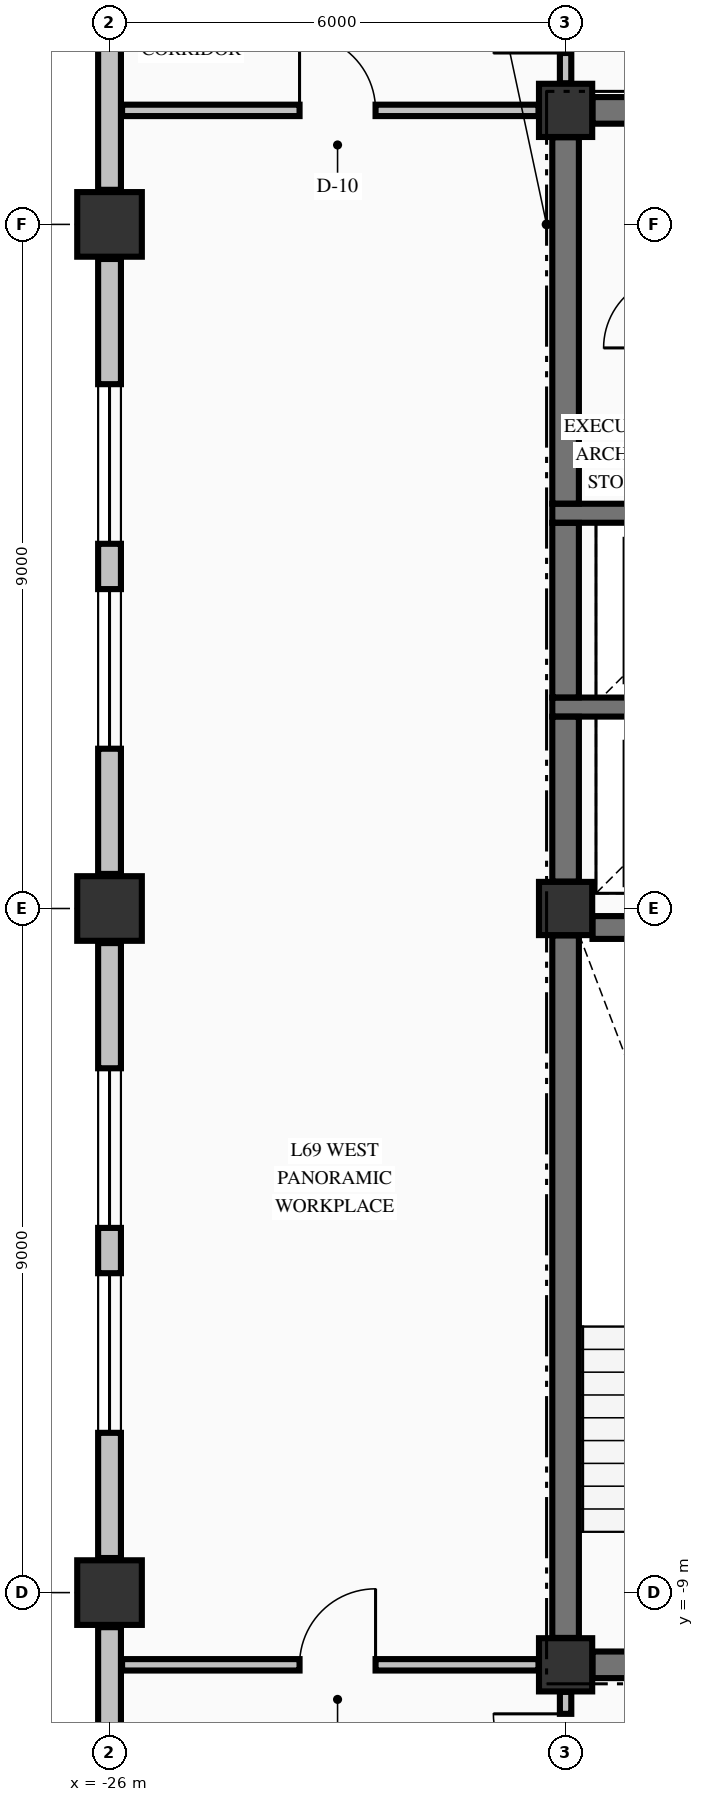
"""IFC4 building model, lengths in metres.
Left out: names, types, materials, properties, quantities, classifications, styles, units other than length and angle.
Written with IfcOpenShell. Run it as: python <this file> out.ifc"""

import sys

from ifc_helpers import new_model, si_unit, direction, frame, frame_2d, origin, origin_2d, place, context, subcontext, project, spatial, rectangle, extrude, element, fill, save


model = new_model("IFC4")
c1 = context("Model", 3, precision=1e-05, world=origin(), true_north=direction((0.0, 1.0)))
c2 = subcontext(c1, "Body", "Model", "MODEL_VIEW")
j1 = project(units=[si_unit("LENGTHUNIT", "METRE"), si_unit("PLANEANGLEUNIT", "RADIAN")], contexts=[c1])
p1 = place(None, origin())
s1 = spatial("IfcSite", under=j1, at=p1, CompositionType="ELEMENT")
p2 = place(p1, origin())
s2 = spatial("IfcBuilding", under=s1, at=p2, CompositionType="ELEMENT")
p3 = place(p2, frame((0.0, 0.0, 260.89)))
s3 = spatial("IfcBuildingStorey", under=s2, at=p3, CompositionType="ELEMENT", Elevation=260.89)
for number, where, z_axis, x_axis in (
    (1, (-26.0, -9.0, -0.25), (0.0, 0.0, 1.0), (1.0, 0.0, 0.0)),
    (2, (-26.0, 0.0, -0.25), (0.0, 0.0, 1.0), (1.0, 0.0, 0.0)),
    (3, (-26.0, 9.0, -0.25), (0.0, 0.0, 1.0), (1.0, 0.0, 0.0)),
):
    element("IfcColumn", number, at=place(p3, frame(where, z_axis=z_axis, x_axis=x_axis)), inside=s3, PredefinedType="COLUMN", context=c2, shape_type="SweptSolid", body=[
        extrude(rectangle(XDim=0.85, YDim=0.85, at=origin_2d()), origin(), (0.0, 0.0, 1.0), 3.23),
    ])
for number, where, z_axis, x_axis in (
    (4, (-20.0, -9.95, -0.25), (0.0, 0.0, 1.0), (1.0, 0.0, 0.0)),
    (5, (-20.0, 10.5, -0.25), (0.0, 0.0, 1.0), (1.0, 0.0, 0.0)),
    (6, (-20.0, 0.0, -0.25), (0.0, 0.0, 1.0), (1.0, 0.0, 0.0)),
):
    element("IfcColumn", number, at=place(p3, frame(where, z_axis=z_axis, x_axis=x_axis)), inside=s3, PredefinedType="COLUMN", context=c2, shape_type="SweptSolid", body=[
        extrude(rectangle(XDim=0.7, YDim=0.7, at=origin_2d()), origin(), (0.0, 0.0, 1.0), 3.23),
    ])
p4 = place(p3, frame((-26.0, -9.455, 0.0), z_axis=(0.0, 0.0, 1.0), x_axis=(0.0, -1.0, 0.0)))
e7 = element("IfcWall", 7, at=p4, inside=s3, PredefinedType="STANDARD", context=c2, shape_type="SweptSolid", body=[
    extrude(rectangle(XDim=8.09, YDim=0.3, at=frame_2d((4.045, 0.0))), origin(), (0.0, 0.0, 1.0), 2.372),
])
p5 = place(p3, frame((-26.0, -0.455, 0.0), z_axis=(0.0, 0.0, 1.0), x_axis=(0.0, -1.0, 0.0)))
e8 = element("IfcWall", 8, at=p5, inside=s3, PredefinedType="STANDARD", context=c2, shape_type="SweptSolid", body=[
    extrude(rectangle(XDim=8.09, YDim=0.3, at=frame_2d((4.045, 0.0))), origin(), (0.0, 0.0, 1.0), 2.372),
])
p6 = place(p5, frame((1.647, 0.0, 0.7)))
e9 = element("IfcOpeningElement", 9, at=p6, cuts=e8, PredefinedType="OPENING", context=c2, shape_type="SweptSolid", body=[
    extrude(rectangle(XDim=2.1, YDim=1.5, at=frame_2d((1.05, 0.75))), frame((0.0, 0.16, 0.0), z_axis=(0.0, -1.0, 0.0), x_axis=(1.0, 0.0, 0.0)), (0.0, 0.0, 1.0), 0.32),
])
p7 = place(p5, frame((4.343, 0.0, 0.7)))
e10 = element("IfcOpeningElement", 10, at=p7, cuts=e8, PredefinedType="OPENING", context=c2, shape_type="SweptSolid", body=[
    extrude(rectangle(XDim=2.1, YDim=1.5, at=frame_2d((1.05, 0.75))), frame((0.0, 0.16, 0.0), z_axis=(0.0, -1.0, 0.0), x_axis=(1.0, 0.0, 0.0)), (0.0, 0.0, 1.0), 0.32),
])
p8 = place(p3, frame((-26.0, 8.545, 0.0), z_axis=(0.0, 0.0, 1.0), x_axis=(0.0, -1.0, 0.0)))
e11 = element("IfcWall", 11, at=p8, inside=s3, PredefinedType="STANDARD", context=c2, shape_type="SweptSolid", body=[
    extrude(rectangle(XDim=8.09, YDim=0.3, at=frame_2d((4.045, 0.0))), origin(), (0.0, 0.0, 1.0), 2.372),
])
p9 = place(p8, frame((1.647, 0.0, 0.7)))
e12 = element("IfcOpeningElement", 12, at=p9, cuts=e11, PredefinedType="OPENING", context=c2, shape_type="SweptSolid", body=[
    extrude(rectangle(XDim=2.1, YDim=1.5, at=frame_2d((1.05, 0.75))), frame((0.0, 0.16, 0.0), z_axis=(0.0, -1.0, 0.0), x_axis=(1.0, 0.0, 0.0)), (0.0, 0.0, 1.0), 0.32),
])
p10 = place(p8, frame((4.343, 0.0, 0.7)))
e13 = element("IfcOpeningElement", 13, at=p10, cuts=e11, PredefinedType="OPENING", context=c2, shape_type="SweptSolid", body=[
    extrude(rectangle(XDim=2.1, YDim=1.5, at=frame_2d((1.05, 0.75))), frame((0.0, 0.16, 0.0), z_axis=(0.0, -1.0, 0.0), x_axis=(1.0, 0.0, 0.0)), (0.0, 0.0, 1.0), 0.32),
])
p11 = place(p3, frame((-26.0, 17.545, 0.0), z_axis=(0.0, 0.0, 1.0), x_axis=(0.0, -1.0, 0.0)))
e14 = element("IfcWall", 14, at=p11, inside=s3, PredefinedType="STANDARD", context=c2, shape_type="SweptSolid", body=[
    extrude(rectangle(XDim=8.09, YDim=0.3, at=frame_2d((4.045, 0.0))), origin(), (0.0, 0.0, 1.0), 2.372),
])
p12 = place(p3, frame((-19.646, -9.95, 0.0), z_axis=(0.0, 0.0, 1.0), x_axis=(1.0, 0.0, 0.0)))
e15 = element("IfcWall", 15, at=p12, inside=s3, PredefinedType="SHEAR", context=c2, shape_type="SweptSolid", body=[
    extrude(rectangle(XDim=4.946, YDim=0.35, at=frame_2d((2.473, 0.0))), origin(), (0.0, 0.0, 1.0), 2.98),
])
p13 = place(p12, frame((0.821, 0.0, 0.0)))
e16 = element("IfcOpeningElement", 16, at=p13, cuts=e15, PredefinedType="OPENING", context=c2, shape_type="SweptSolid", body=[
    extrude(rectangle(XDim=1.05, YDim=2.15, at=frame_2d((0.525, 1.075))), frame((0.0, 0.185, 0.0), z_axis=(0.0, -1.0, 0.0), x_axis=(1.0, 0.0, 0.0)), (0.0, 0.0, 1.0), 0.37),
])
p14 = place(p3, frame((-19.646, -0.25, 0.0), z_axis=(0.0, 0.0, 1.0), x_axis=(1.0, 0.0, 0.0)))
e17 = element("IfcWall", 17, at=p14, inside=s3, PredefinedType="SHEAR", context=c2, shape_type="SweptSolid", body=[
    extrude(rectangle(XDim=8.292, YDim=0.3, at=frame_2d((4.146, 0.0))), origin(), (0.0, 0.0, 1.0), 2.98),
])
p15 = place(p14, frame((5.946, 0.0, 0.0)))
e18 = element("IfcOpeningElement", 18, at=p15, cuts=e17, PredefinedType="OPENING", context=c2, shape_type="SweptSolid", body=[
    extrude(rectangle(XDim=1.1, YDim=2.15, at=frame_2d((0.55, 1.075))), frame((0.0, 0.16, 0.0), z_axis=(0.0, -1.0, 0.0), x_axis=(1.0, 0.0, 0.0)), (0.0, 0.0, 1.0), 0.32),
])
for number, where, z_axis, x_axis in (
    (19, (-20.175, 2.65, 0.0), (0.0, 0.0, 1.0), (1.0, 0.0, 0.0)),
    (20, (-20.175, 5.2, 0.0), (0.0, 0.0, 1.0), (1.0, 0.0, 0.0)),
):
    element("IfcWall", number, at=place(p3, frame(where, z_axis=z_axis, x_axis=x_axis)), inside=s3, PredefinedType="SOLIDWALL", context=c2, shape_type="SweptSolid", body=[
        extrude(rectangle(XDim=3.2, YDim=0.25, at=frame_2d((1.6, 0.0))), origin(), (0.0, 0.0, 1.0), 2.98),
    ])
p16 = place(p3, frame((-19.646, 10.5, 0.0), z_axis=(0.0, 0.0, 1.0), x_axis=(1.0, 0.0, 0.0)))
e21 = element("IfcWall", 21, at=p16, inside=s3, PredefinedType="SHEAR", context=c2, shape_type="SweptSolid", body=[
    extrude(rectangle(XDim=4.946, YDim=0.35, at=frame_2d((2.473, 0.0))), origin(), (0.0, 0.0, 1.0), 2.98),
])
p17 = place(p16, frame((3.196, 0.0, 0.0)))
e22 = element("IfcOpeningElement", 22, at=p17, cuts=e21, PredefinedType="OPENING", context=c2, shape_type="SweptSolid", body=[
    extrude(rectangle(XDim=1.1, YDim=2.15, at=frame_2d((0.55, 1.075))), frame((0.0, 0.185, 0.0), z_axis=(0.0, -1.0, 0.0), x_axis=(1.0, 0.0, 0.0)), (0.0, 0.0, 1.0), 0.37),
])
p18 = place(p16, frame((1.351, 0.0, 0.0)))
e23 = element("IfcOpeningElement", 23, at=p18, cuts=e21, PredefinedType="OPENING", context=c2, shape_type="SweptSolid", body=[
    extrude(rectangle(XDim=0.95, YDim=2.15, at=frame_2d((0.475, 1.075))), frame((0.0, 0.185, 0.0), z_axis=(0.0, -1.0, 0.0), x_axis=(1.0, 0.0, 0.0)), (0.0, 0.0, 1.0), 0.37),
])
p19 = place(p3, frame((-25.835, -9.95, 0.0), z_axis=(0.0, 0.0, 1.0), x_axis=(1.0, 0.0, 0.0)))
e24 = element("IfcWall", 24, at=p19, inside=s3, PredefinedType="PARTITIONING", context=c2, shape_type="SweptSolid", body=[
    extrude(rectangle(XDim=5.479, YDim=0.15, at=frame_2d((2.74, 0.0))), origin(), (0.0, 0.0, 1.0), 2.98),
])
p20 = place(p19, frame((2.335, 0.0, 0.0)))
e25 = element("IfcOpeningElement", 25, at=p20, cuts=e24, PredefinedType="OPENING", context=c2, shape_type="SweptSolid", body=[
    extrude(rectangle(XDim=1.0, YDim=2.15, at=frame_2d((0.5, 1.075))), frame((0.0, 0.085, 0.0), z_axis=(0.0, -1.0, 0.0), x_axis=(1.0, 0.0, 0.0)), (0.0, 0.0, 1.0), 0.17),
])
p21 = place(p3, frame((-25.835, 10.5, 0.0), z_axis=(0.0, 0.0, 1.0), x_axis=(1.0, 0.0, 0.0)))
e26 = element("IfcWall", 26, at=p21, inside=s3, PredefinedType="PARTITIONING", context=c2, shape_type="SweptSolid", body=[
    extrude(rectangle(XDim=5.479, YDim=0.15, at=frame_2d((2.74, 0.0))), origin(), (0.0, 0.0, 1.0), 2.98),
])
p22 = place(p21, frame((2.335, 0.0, 0.0)))
e27 = element("IfcOpeningElement", 27, at=p22, cuts=e26, PredefinedType="OPENING", context=c2, shape_type="SweptSolid", body=[
    extrude(rectangle(XDim=1.0, YDim=2.15, at=frame_2d((0.5, 1.075))), frame((0.0, 0.085, 0.0), z_axis=(0.0, -1.0, 0.0), x_axis=(1.0, 0.0, 0.0)), (0.0, 0.0, 1.0), 0.17),
])
p23 = place(p3, frame((-20.0, -9.596, 0.0), z_axis=(0.0, 0.0, 1.0), x_axis=(0.0, 1.0, 0.0)))
e28 = element("IfcWall", 28, at=p23, inside=s3, PredefinedType="SHEAR", context=c2, shape_type="SweptSolid", body=[
    extrude(rectangle(XDim=9.242, YDim=0.35, at=frame_2d((4.621, 0.0))), origin(), (0.0, 0.0, 1.0), 2.98),
])
p24 = place(p3, frame((-20.0, 0.354, 0.0), z_axis=(0.0, 0.0, 1.0), x_axis=(0.0, 1.0, 0.0)))
e29 = element("IfcWall", 29, at=p24, inside=s3, PredefinedType="SHEAR", context=c2, shape_type="SweptSolid", body=[
    extrude(rectangle(XDim=2.169, YDim=0.35, at=frame_2d((1.084, 0.0))), origin(), (0.0, 0.0, 1.0), 2.98),
])
p25 = place(p3, frame((-20.0, 2.777, 0.0), z_axis=(0.0, 0.0, 1.0), x_axis=(0.0, 1.0, 0.0)))
e30 = element("IfcWall", 30, at=p25, inside=s3, PredefinedType="SHEAR", context=c2, shape_type="SweptSolid", body=[
    extrude(rectangle(XDim=2.296, YDim=0.35, at=frame_2d((1.148, 0.0))), origin(), (0.0, 0.0, 1.0), 2.98),
])
p26 = place(p3, frame((-20.0, 5.327, 0.0), z_axis=(0.0, 0.0, 1.0), x_axis=(0.0, 1.0, 0.0)))
e31 = element("IfcWall", 31, at=p26, inside=s3, PredefinedType="SHEAR", context=c2, shape_type="SweptSolid", body=[
    extrude(rectangle(XDim=4.819, YDim=0.35, at=frame_2d((2.41, 0.0))), origin(), (0.0, 0.0, 1.0), 2.98),
])
p27 = place(p3, frame((-20.0, -12.122, 0.0), z_axis=(0.0, 0.0, 1.0), x_axis=(0.0, 1.0, 0.0)))
e32 = element("IfcWall", 32, at=p27, inside=s3, PredefinedType="PARTITIONING", context=c2, shape_type="SweptSolid", body=[
    extrude(rectangle(XDim=1.816, YDim=0.15, at=frame_2d((0.908, 0.0))), origin(), (0.0, 0.0, 1.0), 2.98),
])
p28 = place(p27, frame((0.577, 0.0, 0.0)))
e33 = element("IfcOpeningElement", 33, at=p28, cuts=e32, PredefinedType="OPENING", context=c2, shape_type="SweptSolid", body=[
    extrude(rectangle(XDim=0.95, YDim=2.15, at=frame_2d((0.475, 1.075))), frame((0.0, 0.085, 0.0), z_axis=(0.0, -1.0, 0.0), x_axis=(1.0, 0.0, 0.0)), (0.0, 0.0, 1.0), 0.17),
])
p29 = place(p3, frame((-20.0, 10.856, 0.0), z_axis=(0.0, 0.0, 1.0), x_axis=(0.0, 1.0, 0.0)))
e34 = element("IfcWall", 34, at=p29, inside=s3, PredefinedType="PARTITIONING", context=c2, shape_type="SweptSolid", body=[
    extrude(rectangle(XDim=2.016, YDim=0.15, at=frame_2d((1.008, 0.0))), origin(), (0.0, 0.0, 1.0), 2.98),
])
p30 = place(p29, frame((0.399, 0.0, 0.0)))
e35 = element("IfcOpeningElement", 35, at=p30, cuts=e34, PredefinedType="OPENING", context=c2, shape_type="SweptSolid", body=[
    extrude(rectangle(XDim=0.95, YDim=2.15, at=frame_2d((0.475, 1.075))), frame((0.0, 0.085, 0.0), z_axis=(0.0, -1.0, 0.0), x_axis=(1.0, 0.0, 0.0)), (0.0, 0.0, 1.0), 0.17),
])
p31 = place(p6, origin())
e36 = element("IfcWindow", 36, at=p31, inside=s3, PartitioningType="SINGLE_PANEL", PredefinedType="WINDOW", context=c2, shape_type="SweptSolid", body=[
    extrude(rectangle(XDim=2.1, YDim=1.5, at=frame_2d((1.05, 0.75))), frame((0.0, 0.03, 0.0), z_axis=(0.0, -1.0, 0.0), x_axis=(1.0, 0.0, 0.0)), (0.0, 0.0, 1.0), 0.06),
])
fill(e9, e36)
p32 = place(p7, origin())
e37 = element("IfcWindow", 37, at=p32, inside=s3, PartitioningType="SINGLE_PANEL", PredefinedType="WINDOW", context=c2, shape_type="SweptSolid", body=[
    extrude(rectangle(XDim=2.1, YDim=1.5, at=frame_2d((1.05, 0.75))), frame((0.0, 0.03, 0.0), z_axis=(0.0, -1.0, 0.0), x_axis=(1.0, 0.0, 0.0)), (0.0, 0.0, 1.0), 0.06),
])
fill(e10, e37)
p33 = place(p9, origin())
e38 = element("IfcWindow", 38, at=p33, inside=s3, PartitioningType="SINGLE_PANEL", PredefinedType="WINDOW", context=c2, shape_type="SweptSolid", body=[
    extrude(rectangle(XDim=2.1, YDim=1.5, at=frame_2d((1.05, 0.75))), frame((0.0, 0.03, 0.0), z_axis=(0.0, -1.0, 0.0), x_axis=(1.0, 0.0, 0.0)), (0.0, 0.0, 1.0), 0.06),
])
fill(e12, e38)
p34 = place(p10, origin())
e39 = element("IfcWindow", 39, at=p34, inside=s3, PartitioningType="SINGLE_PANEL", PredefinedType="WINDOW", context=c2, shape_type="SweptSolid", body=[
    extrude(rectangle(XDim=2.1, YDim=1.5, at=frame_2d((1.05, 0.75))), frame((0.0, 0.03, 0.0), z_axis=(0.0, -1.0, 0.0), x_axis=(1.0, 0.0, 0.0)), (0.0, 0.0, 1.0), 0.06),
])
fill(e13, e39)
p35 = place(p30, origin())
e40 = element("IfcDoor", 40, at=p35, inside=s3, OperationType="SINGLE_SWING_LEFT", PredefinedType="DOOR", context=c2, shape_type="SweptSolid", body=[
    extrude(rectangle(XDim=0.95, YDim=2.15, at=frame_2d((0.475, 1.075))), frame((0.0, 0.025, 0.0), z_axis=(0.0, -1.0, 0.0), x_axis=(1.0, 0.0, 0.0)), (0.0, 0.0, 1.0), 0.05),
])
fill(e35, e40)
p36 = place(p28, origin())
e41 = element("IfcDoor", 41, at=p36, inside=s3, OperationType="SINGLE_SWING_RIGHT", PredefinedType="DOOR", context=c2, shape_type="SweptSolid", body=[
    extrude(rectangle(XDim=0.95, YDim=2.15, at=frame_2d((0.475, 1.075))), frame((0.0, 0.025, 0.0), z_axis=(0.0, -1.0, 0.0), x_axis=(1.0, 0.0, 0.0)), (0.0, 0.0, 1.0), 0.05),
])
fill(e33, e41)
p37 = place(p22, origin())
e42 = element("IfcDoor", 42, at=p37, inside=s3, OperationType="SINGLE_SWING_LEFT", PredefinedType="DOOR", context=c2, shape_type="SweptSolid", body=[
    extrude(rectangle(XDim=1.0, YDim=2.15, at=frame_2d((0.5, 1.075))), frame((0.0, 0.025, 0.0), z_axis=(0.0, -1.0, 0.0), x_axis=(1.0, 0.0, 0.0)), (0.0, 0.0, 1.0), 0.05),
])
fill(e27, e42)
p38 = place(p20, origin())
e43 = element("IfcDoor", 43, at=p38, inside=s3, OperationType="SINGLE_SWING_RIGHT", PredefinedType="DOOR", context=c2, shape_type="SweptSolid", body=[
    extrude(rectangle(XDim=1.0, YDim=2.15, at=frame_2d((0.5, 1.075))), frame((0.0, 0.025, 0.0), z_axis=(0.0, -1.0, 0.0), x_axis=(1.0, 0.0, 0.0)), (0.0, 0.0, 1.0), 0.05),
])
fill(e25, e43)
save(model, sys.argv[1])
